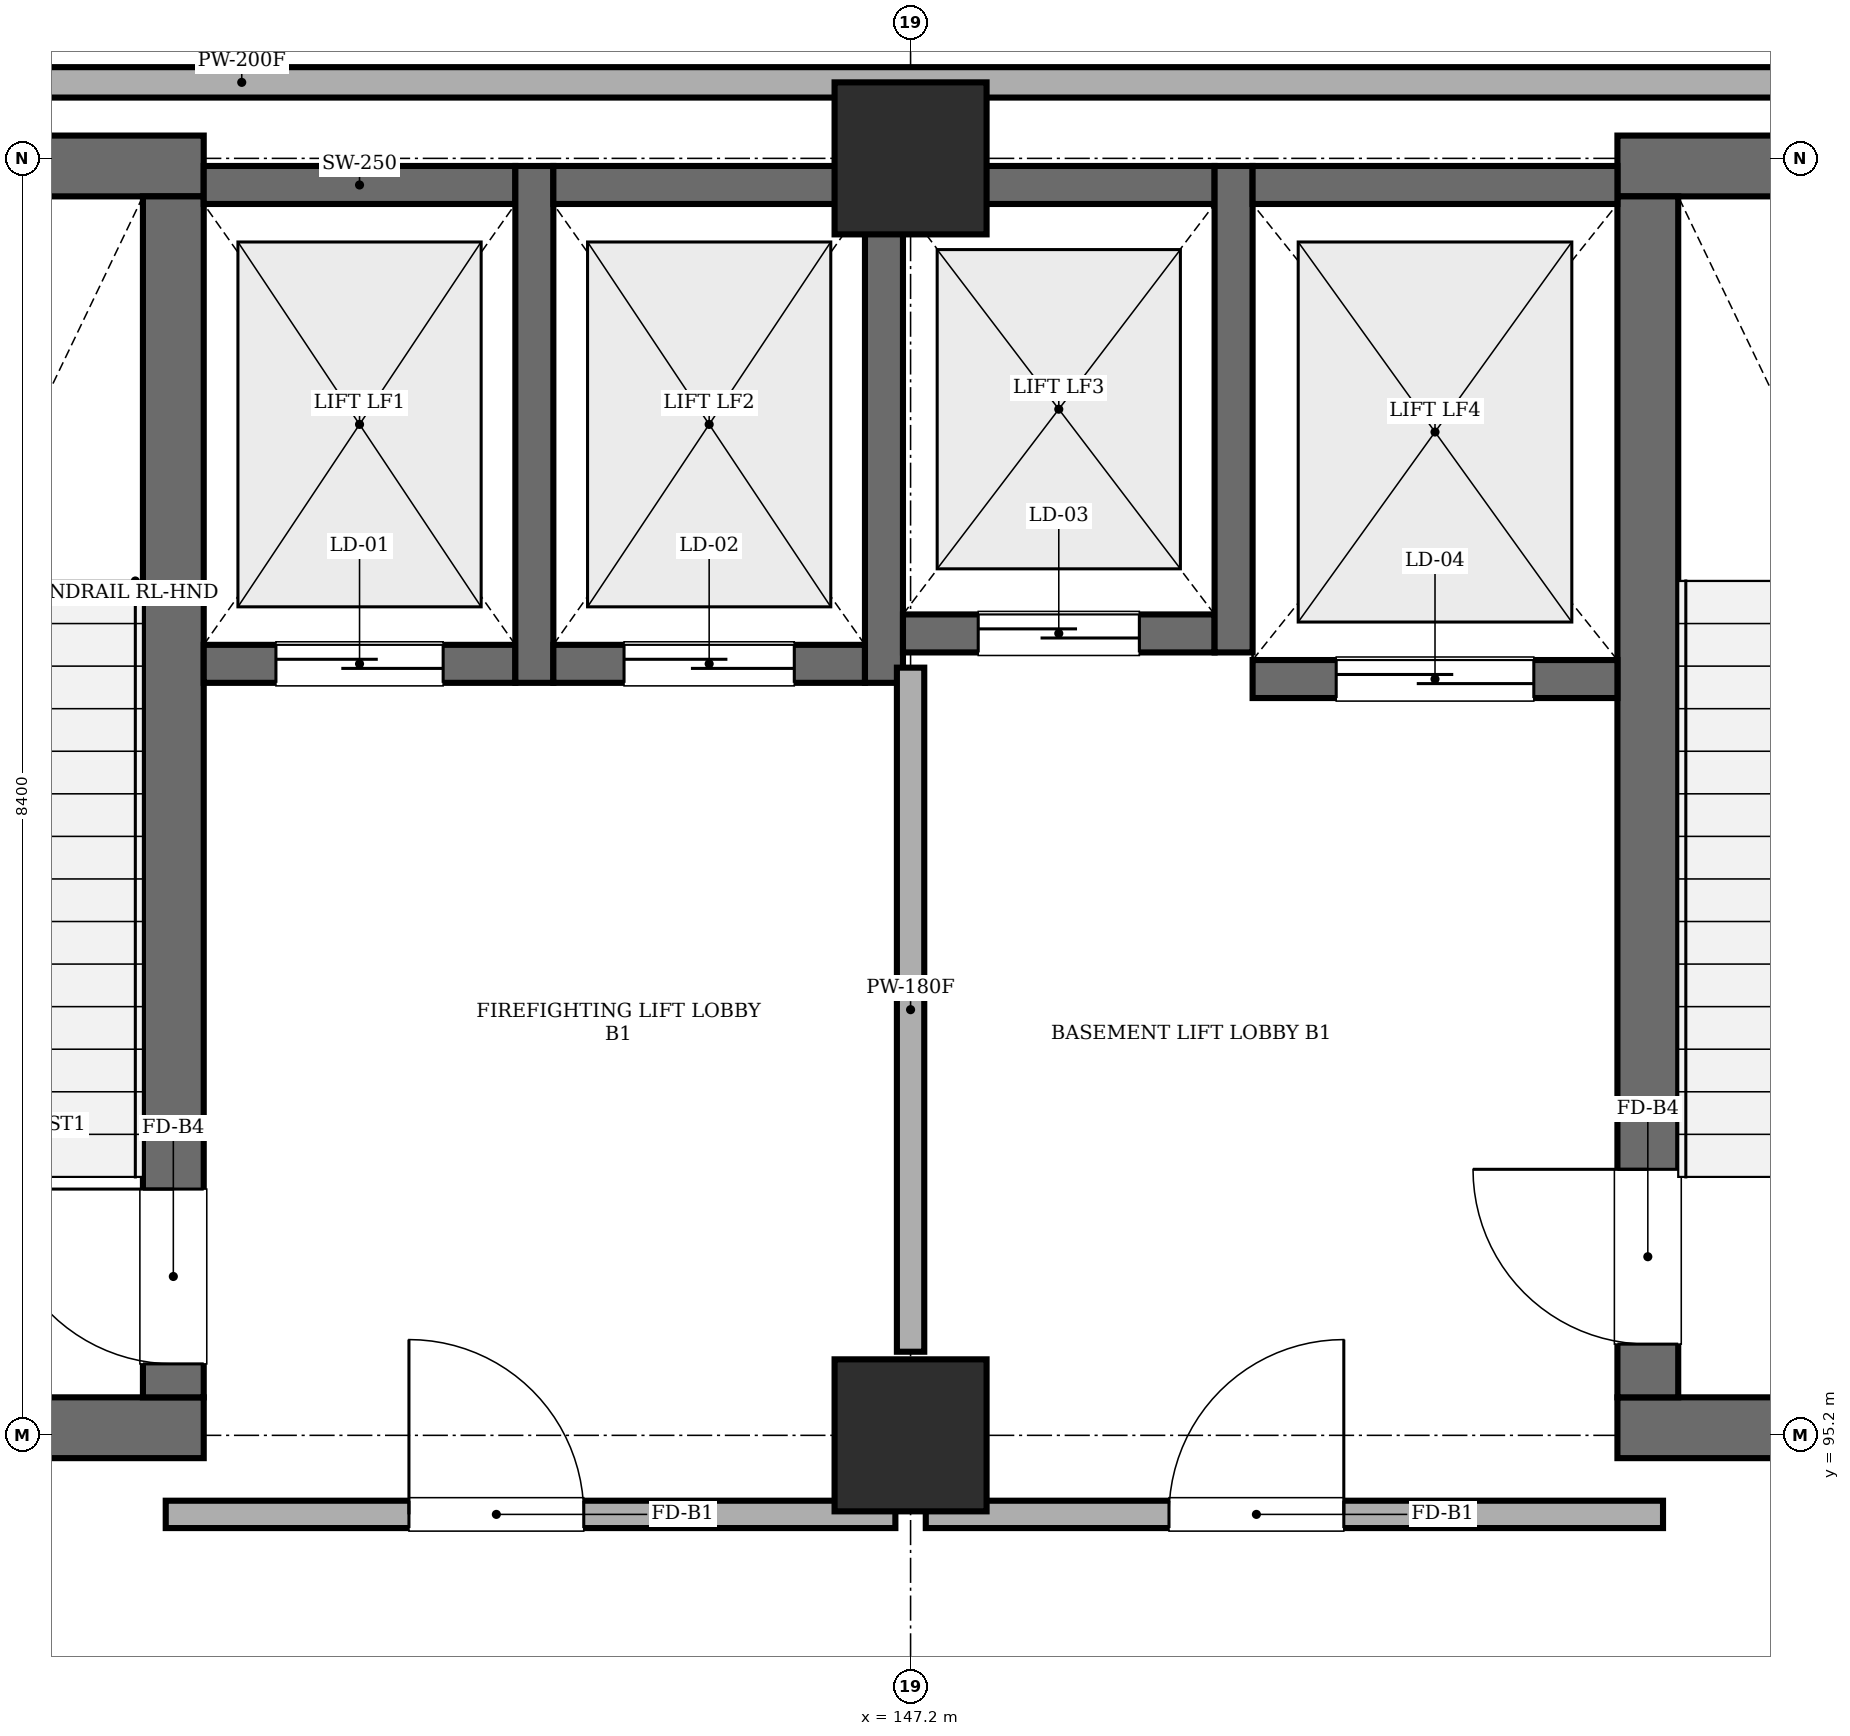
"""IFC4 building model, lengths in metres.
Left out: names, types, materials, properties, quantities, classifications, styles, units other than length and angle.
Written with IfcOpenShell. Run it as: python <this file> out.ifc"""

import sys

from ifc_helpers import new_model, si_unit, direction, frame, frame_2d, origin, origin_2d, place, context, subcontext, project, spatial, rectangle, extrude, element, fill, save


model = new_model("IFC4")
c1 = context("Model", 3, precision=1e-05, world=origin(), true_north=direction((0.0, 1.0)))
c2 = subcontext(c1, "Body", "Model", "MODEL_VIEW")
j1 = project(units=[si_unit("LENGTHUNIT", "METRE"), si_unit("PLANEANGLEUNIT", "RADIAN")], contexts=[c1])
p1 = place(None, origin())
s1 = spatial("IfcSite", under=j1, at=p1, CompositionType="ELEMENT")
p2 = place(p1, origin())
s2 = spatial("IfcBuilding", under=s1, at=p2, CompositionType="ELEMENT")
p3 = place(p2, frame((0.0, 0.0, -4.8)))
s3 = spatial("IfcBuildingStorey", under=s2, at=p3, CompositionType="ELEMENT", Elevation=-4.8)
for number, where, z_axis, x_axis in (
    (1, (147.2, 95.2, 0.0), (0.0, 0.0, 1.0), (1.0, 0.0, 0.0)),
    (2, (147.2, 103.6, 0.0), (0.0, 0.0, 1.0), (1.0, 0.0, 0.0)),
):
    element("IfcColumn", number, at=place(p3, frame(where, z_axis=z_axis, x_axis=x_axis)), inside=s3, PredefinedType="COLUMN", context=c2, shape_type="SweptSolid", body=[
        extrude(rectangle(XDim=1.0, YDim=1.0, at=origin_2d()), origin(), (0.0, 0.0, 1.0), 4.395),
    ])
for number, where, z_axis, x_axis in (
    (3, (138.65, 95.25, 0.0), (0.0, 0.0, 1.0), (1.0, 0.0, 0.0)),
    (4, (138.65, 103.55, 0.0), (0.0, 0.0, 1.0), (1.0, 0.0, 0.0)),
):
    element("IfcWall", number, at=place(p3, frame(where, z_axis=z_axis, x_axis=x_axis)), inside=s3, PredefinedType="SHEAR", context=c2, shape_type="SweptSolid", body=[
        extrude(rectangle(XDim=3.9, YDim=0.4, at=frame_2d((1.95, 0.0))), origin(), (0.0, 0.0, 1.0), 4.395),
    ])
p4 = place(p3, frame((142.35, 95.45, 0.0), z_axis=(0.0, 0.0, 1.0), x_axis=(0.0, 1.0, 0.0)))
e5 = element("IfcWall", 5, at=p4, inside=s3, PredefinedType="SHEAR", context=c2, shape_type="SweptSolid", body=[
    extrude(rectangle(XDim=7.9, YDim=0.4, at=frame_2d((3.95, 0.0))), origin(), (0.0, 0.0, 1.0), 4.395),
])
p5 = place(p4, frame((0.22, 0.0, 0.0)))
e6 = element("IfcOpeningElement", 6, at=p5, cuts=e5, PredefinedType="OPENING", context=c2, shape_type="SweptSolid", body=[
    extrude(rectangle(XDim=1.15, YDim=2.15, at=frame_2d((0.575, 1.075))), frame((0.0, 0.21, 0.0), z_axis=(0.0, -1.0, 0.0), x_axis=(1.0, 0.0, 0.0)), (0.0, 0.0, 1.0), 0.42),
])
for number, where, z_axis, x_axis in (
    (7, (151.85, 95.25, 0.0), (0.0, 0.0, 1.0), (1.0, 0.0, 0.0)),
    (8, (151.85, 103.55, 0.0), (0.0, 0.0, 1.0), (1.0, 0.0, 0.0)),
):
    element("IfcWall", number, at=place(p3, frame(where, z_axis=z_axis, x_axis=x_axis)), inside=s3, PredefinedType="SHEAR", context=c2, shape_type="SweptSolid", body=[
        extrude(rectangle(XDim=3.9, YDim=0.4, at=frame_2d((1.95, 0.0))), origin(), (0.0, 0.0, 1.0), 4.395),
    ])
p6 = place(p3, frame((152.05, 95.45, 0.0), z_axis=(0.0, 0.0, 1.0), x_axis=(0.0, 1.0, 0.0)))
e9 = element("IfcWall", 9, at=p6, inside=s3, PredefinedType="SHEAR", context=c2, shape_type="SweptSolid", body=[
    extrude(rectangle(XDim=7.9, YDim=0.4, at=frame_2d((3.95, 0.0))), origin(), (0.0, 0.0, 1.0), 4.395),
])
p7 = place(p6, frame((0.35, 0.0, 0.0)))
e10 = element("IfcOpeningElement", 10, at=p7, cuts=e9, PredefinedType="OPENING", context=c2, shape_type="SweptSolid", body=[
    extrude(rectangle(XDim=1.15, YDim=2.15, at=frame_2d((0.575, 1.075))), frame((0.0, 0.21, 0.0), z_axis=(0.0, -1.0, 0.0), x_axis=(1.0, 0.0, 0.0)), (0.0, 0.0, 1.0), 0.42),
])
p8 = place(p3, frame((142.55, 100.275, 0.0), z_axis=(0.0, 0.0, 1.0), x_axis=(1.0, 0.0, 0.0)))
e11 = element("IfcWall", 11, at=p8, inside=s3, PredefinedType="SHEAR", context=c2, shape_type="SweptSolid", body=[
    extrude(rectangle(XDim=2.05, YDim=0.25, at=frame_2d((1.025, 0.0))), origin(), (0.0, 0.0, 1.0), 4.395),
])
p9 = place(p8, frame((0.475, 0.0, 0.0)))
e12 = element("IfcOpeningElement", 12, at=p9, cuts=e11, PredefinedType="OPENING", context=c2, shape_type="SweptSolid", body=[
    extrude(rectangle(XDim=1.1, YDim=2.15, at=frame_2d((0.55, 1.075))), frame((0.0, 0.135, 0.0), z_axis=(0.0, -1.0, 0.0), x_axis=(1.0, 0.0, 0.0)), (0.0, 0.0, 1.0), 0.27),
])
p10 = place(p3, frame((142.55, 103.425, 0.0), z_axis=(0.0, 0.0, 1.0), x_axis=(1.0, 0.0, 0.0)))
e13 = element("IfcWall", 13, at=p10, inside=s3, PredefinedType="SHEAR", context=c2, shape_type="SweptSolid", body=[
    extrude(rectangle(XDim=2.05, YDim=0.25, at=frame_2d((1.025, 0.0))), origin(), (0.0, 0.0, 1.0), 4.395),
])
p11 = place(p3, frame((144.725, 100.15, 0.0), z_axis=(0.0, 0.0, 1.0), x_axis=(0.0, 1.0, 0.0)))
e14 = element("IfcWall", 14, at=p11, inside=s3, PredefinedType="SHEAR", context=c2, shape_type="SweptSolid", body=[
    extrude(rectangle(XDim=3.4, YDim=0.25, at=frame_2d((1.7, 0.0))), origin(), (0.0, 0.0, 1.0), 4.395),
])
p12 = place(p3, frame((144.85, 100.275, 0.0), z_axis=(0.0, 0.0, 1.0), x_axis=(1.0, 0.0, 0.0)))
e15 = element("IfcWall", 15, at=p12, inside=s3, PredefinedType="SHEAR", context=c2, shape_type="SweptSolid", body=[
    extrude(rectangle(XDim=2.05, YDim=0.25, at=frame_2d((1.025, 0.0))), origin(), (0.0, 0.0, 1.0), 4.395),
])
p13 = place(p12, frame((0.465, 0.0, 0.0)))
e16 = element("IfcOpeningElement", 16, at=p13, cuts=e15, PredefinedType="OPENING", context=c2, shape_type="SweptSolid", body=[
    extrude(rectangle(XDim=1.12, YDim=2.15, at=frame_2d((0.56, 1.075))), frame((0.0, 0.135, 0.0), z_axis=(0.0, -1.0, 0.0), x_axis=(1.0, 0.0, 0.0)), (0.0, 0.0, 1.0), 0.27),
])
p14 = place(p3, frame((144.85, 103.425, 0.0), z_axis=(0.0, 0.0, 1.0), x_axis=(1.0, 0.0, 0.0)))
e17 = element("IfcWall", 17, at=p14, inside=s3, PredefinedType="SHEAR", context=c2, shape_type="SweptSolid", body=[
    extrude(rectangle(XDim=2.05, YDim=0.25, at=frame_2d((1.025, 0.0))), origin(), (0.0, 0.0, 1.0), 4.395),
])
p15 = place(p3, frame((147.025, 100.15, 0.0), z_axis=(0.0, 0.0, 1.0), x_axis=(0.0, 1.0, 0.0)))
e18 = element("IfcWall", 18, at=p15, inside=s3, PredefinedType="SHEAR", context=c2, shape_type="SweptSolid", body=[
    extrude(rectangle(XDim=3.4, YDim=0.25, at=frame_2d((1.7, 0.0))), origin(), (0.0, 0.0, 1.0), 4.395),
])
p16 = place(p3, frame((147.15, 100.475, 0.0), z_axis=(0.0, 0.0, 1.0), x_axis=(1.0, 0.0, 0.0)))
e19 = element("IfcWall", 19, at=p16, inside=s3, PredefinedType="SHEAR", context=c2, shape_type="SweptSolid", body=[
    extrude(rectangle(XDim=2.05, YDim=0.25, at=frame_2d((1.025, 0.0))), origin(), (0.0, 0.0, 1.0), 4.395),
])
p17 = place(p16, frame((0.495, 0.0, 0.0)))
e20 = element("IfcOpeningElement", 20, at=p17, cuts=e19, PredefinedType="OPENING", context=c2, shape_type="SweptSolid", body=[
    extrude(rectangle(XDim=1.06, YDim=2.15, at=frame_2d((0.53, 1.075))), frame((0.0, 0.135, 0.0), z_axis=(0.0, -1.0, 0.0), x_axis=(1.0, 0.0, 0.0)), (0.0, 0.0, 1.0), 0.27),
])
p18 = place(p3, frame((147.15, 103.425, 0.0), z_axis=(0.0, 0.0, 1.0), x_axis=(1.0, 0.0, 0.0)))
e21 = element("IfcWall", 21, at=p18, inside=s3, PredefinedType="SHEAR", context=c2, shape_type="SweptSolid", body=[
    extrude(rectangle(XDim=2.05, YDim=0.25, at=frame_2d((1.025, 0.0))), origin(), (0.0, 0.0, 1.0), 4.395),
])
p19 = place(p3, frame((149.325, 100.35, 0.0), z_axis=(0.0, 0.0, 1.0), x_axis=(0.0, 1.0, 0.0)))
e22 = element("IfcWall", 22, at=p19, inside=s3, PredefinedType="SHEAR", context=c2, shape_type="SweptSolid", body=[
    extrude(rectangle(XDim=3.2, YDim=0.25, at=frame_2d((1.6, 0.0))), origin(), (0.0, 0.0, 1.0), 4.395),
])
p20 = place(p3, frame((149.45, 100.175, 0.0), z_axis=(0.0, 0.0, 1.0), x_axis=(1.0, 0.0, 0.0)))
e23 = element("IfcWall", 23, at=p20, inside=s3, PredefinedType="SHEAR", context=c2, shape_type="SweptSolid", body=[
    extrude(rectangle(XDim=2.4, YDim=0.25, at=frame_2d((1.2, 0.0))), origin(), (0.0, 0.0, 1.0), 4.395),
])
p21 = place(p20, frame((0.55, 0.0, 0.0)))
e24 = element("IfcOpeningElement", 24, at=p21, cuts=e23, PredefinedType="OPENING", context=c2, shape_type="SweptSolid", body=[
    extrude(rectangle(XDim=1.3, YDim=2.25, at=frame_2d((0.65, 1.125))), frame((0.0, 0.135, 0.0), z_axis=(0.0, -1.0, 0.0), x_axis=(1.0, 0.0, 0.0)), (0.0, 0.0, 1.0), 0.27),
])
p22 = place(p3, frame((149.45, 103.425, 0.0), z_axis=(0.0, 0.0, 1.0), x_axis=(1.0, 0.0, 0.0)))
e25 = element("IfcWall", 25, at=p22, inside=s3, PredefinedType="SHEAR", context=c2, shape_type="SweptSolid", body=[
    extrude(rectangle(XDim=2.4, YDim=0.25, at=frame_2d((1.2, 0.0))), origin(), (0.0, 0.0, 1.0), 4.395),
])
p23 = place(p3, frame((142.3, 94.68, 0.0), z_axis=(0.0, 0.0, 1.0), x_axis=(1.0, 0.0, 0.0)))
e26 = element("IfcWall", 26, at=p23, inside=s3, PredefinedType="STANDARD", context=c2, shape_type="SweptSolid", body=[
    extrude(rectangle(XDim=4.8, YDim=0.18, at=frame_2d((2.4, 0.0))), origin(), (0.0, 0.0, 1.0), 4.395),
])
p24 = place(p23, frame((1.6, 0.0, 0.0)))
e27 = element("IfcOpeningElement", 27, at=p24, cuts=e26, PredefinedType="OPENING", context=c2, shape_type="SweptSolid", body=[
    extrude(rectangle(XDim=1.15, YDim=2.15, at=frame_2d((0.575, 1.075))), frame((0.0, 0.1, 0.0), z_axis=(0.0, -1.0, 0.0), x_axis=(1.0, 0.0, 0.0)), (0.0, 0.0, 1.0), 0.2),
])
p25 = place(p3, frame((147.3, 94.68, 0.0), z_axis=(0.0, 0.0, 1.0), x_axis=(1.0, 0.0, 0.0)))
e28 = element("IfcWall", 28, at=p25, inside=s3, PredefinedType="STANDARD", context=c2, shape_type="SweptSolid", body=[
    extrude(rectangle(XDim=4.85, YDim=0.18, at=frame_2d((2.425, 0.0))), origin(), (0.0, 0.0, 1.0), 4.395),
])
p26 = place(p25, frame((1.6, 0.0, 0.0)))
e29 = element("IfcOpeningElement", 29, at=p26, cuts=e28, PredefinedType="OPENING", context=c2, shape_type="SweptSolid", body=[
    extrude(rectangle(XDim=1.15, YDim=2.15, at=frame_2d((0.575, 1.075))), frame((0.0, 0.1, 0.0), z_axis=(0.0, -1.0, 0.0), x_axis=(1.0, 0.0, 0.0)), (0.0, 0.0, 1.0), 0.2),
])
p27 = place(p3, frame((147.2, 95.75, 0.0), z_axis=(0.0, 0.0, 1.0), x_axis=(0.0, 1.0, 0.0)))
e30 = element("IfcWall", 30, at=p27, inside=s3, PredefinedType="STANDARD", context=c2, shape_type="SweptSolid", body=[
    extrude(rectangle(XDim=4.5, YDim=0.18, at=frame_2d((2.25, 0.0))), origin(), (0.0, 0.0, 1.0), 3.595),
])
p28 = place(p3, frame((122.4, 104.1, 0.0), z_axis=(0.0, 0.0, 1.0), x_axis=(1.0, 0.0, 0.0)))
e31 = element("IfcWall", 31, at=p28, inside=s3, PredefinedType="SOLIDWALL", context=c2, shape_type="SweptSolid", body=[
    extrude(rectangle(XDim=40.8, YDim=0.2, at=frame_2d((20.4, 0.0))), origin(), (0.0, 0.0, 1.0), 4.395),
])
p29 = place(p28, frame((11.2, 0.0, 0.0)))
e32 = element("IfcOpeningElement", 32, at=p29, cuts=e31, PredefinedType="OPENING", context=c2, shape_type="SweptSolid", body=[
    extrude(rectangle(XDim=1.25, YDim=2.2, at=frame_2d((0.625, 1.1))), frame((0.0, 0.11, 0.0), z_axis=(0.0, -1.0, 0.0), x_axis=(1.0, 0.0, 0.0)), (0.0, 0.0, 1.0), 0.22),
])
p30 = place(p24, origin())
e33 = element("IfcDoor", 33, at=p30, inside=s3, OperationType="SINGLE_SWING_LEFT", PredefinedType="DOOR", context=c2, shape_type="SweptSolid", body=[
    extrude(rectangle(XDim=1.15, YDim=2.15, at=frame_2d((0.575, 1.075))), frame((0.0, 0.025, 0.0), z_axis=(0.0, -1.0, 0.0), x_axis=(1.0, 0.0, 0.0)), (0.0, 0.0, 1.0), 0.05),
])
fill(e27, e33)
p31 = place(p26, origin())
e34 = element("IfcDoor", 34, at=p31, inside=s3, OperationType="SINGLE_SWING_RIGHT", PredefinedType="DOOR", context=c2, shape_type="SweptSolid", body=[
    extrude(rectangle(XDim=1.15, YDim=2.15, at=frame_2d((0.575, 1.075))), frame((0.0, 0.025, 0.0), z_axis=(0.0, -1.0, 0.0), x_axis=(1.0, 0.0, 0.0)), (0.0, 0.0, 1.0), 0.05),
])
fill(e29, e34)
p32 = place(p5, origin())
e35 = element("IfcDoor", 35, at=p32, inside=s3, OperationType="SINGLE_SWING_RIGHT", PredefinedType="DOOR", context=c2, shape_type="SweptSolid", body=[
    extrude(rectangle(XDim=1.15, YDim=2.15, at=frame_2d((0.575, 1.075))), frame((0.0, 0.025, 0.0), z_axis=(0.0, -1.0, 0.0), x_axis=(1.0, 0.0, 0.0)), (0.0, 0.0, 1.0), 0.05),
])
fill(e6, e35)
p33 = place(p7, origin())
e36 = element("IfcDoor", 36, at=p33, inside=s3, OperationType="SINGLE_SWING_RIGHT", PredefinedType="DOOR", context=c2, shape_type="SweptSolid", body=[
    extrude(rectangle(XDim=1.15, YDim=2.15, at=frame_2d((0.575, 1.075))), frame((0.0, 0.025, 0.0), z_axis=(0.0, -1.0, 0.0), x_axis=(1.0, 0.0, 0.0)), (0.0, 0.0, 1.0), 0.05),
])
fill(e10, e36)
p34 = place(p9, origin())
e37 = element("IfcDoor", 37, at=p34, inside=s3, OperationType="SLIDING_TO_LEFT", PredefinedType="DOOR", context=c2, shape_type="SweptSolid", body=[
    extrude(rectangle(XDim=1.1, YDim=2.15, at=frame_2d((0.55, 1.075))), frame((0.0, 0.025, 0.0), z_axis=(0.0, -1.0, 0.0), x_axis=(1.0, 0.0, 0.0)), (0.0, 0.0, 1.0), 0.05),
])
fill(e12, e37)
p35 = place(p13, origin())
e38 = element("IfcDoor", 38, at=p35, inside=s3, OperationType="SLIDING_TO_LEFT", PredefinedType="DOOR", context=c2, shape_type="SweptSolid", body=[
    extrude(rectangle(XDim=1.12, YDim=2.15, at=frame_2d((0.56, 1.075))), frame((0.0, 0.025, 0.0), z_axis=(0.0, -1.0, 0.0), x_axis=(1.0, 0.0, 0.0)), (0.0, 0.0, 1.0), 0.05),
])
fill(e16, e38)
p36 = place(p17, origin())
e39 = element("IfcDoor", 39, at=p36, inside=s3, OperationType="SLIDING_TO_LEFT", PredefinedType="DOOR", context=c2, shape_type="SweptSolid", body=[
    extrude(rectangle(XDim=1.06, YDim=2.15, at=frame_2d((0.53, 1.075))), frame((0.0, 0.025, 0.0), z_axis=(0.0, -1.0, 0.0), x_axis=(1.0, 0.0, 0.0)), (0.0, 0.0, 1.0), 0.05),
])
fill(e20, e39)
p37 = place(p21, origin())
e40 = element("IfcDoor", 40, at=p37, inside=s3, OperationType="SLIDING_TO_LEFT", PredefinedType="DOOR", context=c2, shape_type="SweptSolid", body=[
    extrude(rectangle(XDim=1.3, YDim=2.25, at=frame_2d((0.65, 1.125))), frame((0.0, 0.025, 0.0), z_axis=(0.0, -1.0, 0.0), x_axis=(1.0, 0.0, 0.0)), (0.0, 0.0, 1.0), 0.05),
])
fill(e24, e40)
save(model, sys.argv[1])
